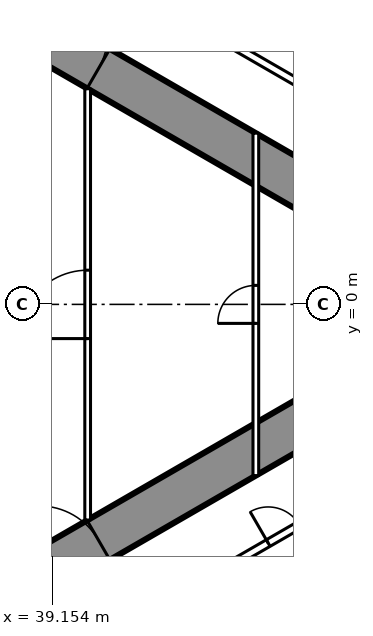
"""IFC4 building model, lengths in metres.
Left out: names, types, materials, properties, quantities, classifications, styles, units other than length and angle.
Written with IfcOpenShell. Run it as: python <this file> out.ifc"""

import sys

from ifc_helpers import new_model, si_unit, direction, frame, frame_2d, origin, place, context, subcontext, project, spatial, rectangle, extrude, element, fill, save


model = new_model("IFC4")
c1 = context("Model", 3, precision=1e-05, world=origin(), true_north=direction((0.0, 1.0)))
c2 = subcontext(c1, "Body", "Model", "MODEL_VIEW")
j1 = project(units=[si_unit("LENGTHUNIT", "METRE"), si_unit("PLANEANGLEUNIT", "RADIAN")], contexts=[c1])
p1 = place(None, origin())
s1 = spatial("IfcSite", under=j1, at=p1, CompositionType="ELEMENT")
p2 = place(p1, origin())
s2 = spatial("IfcBuilding", under=s1, at=p2, CompositionType="ELEMENT")
p3 = place(p2, frame((0.0, 0.0, 226.1)))
s3 = spatial("IfcBuildingStorey", under=s2, at=p3, CompositionType="ELEMENT", Elevation=226.1)
p4 = place(p3, frame((27.2, -13.8, 0.0), z_axis=(0.0, 0.0, 1.0), x_axis=(0.866027159892, 0.499996958321, 0.0)))
e1 = element("IfcWall", 1, at=p4, inside=s3, PredefinedType="SHEAR", context=c2, shape_type="SweptSolid", body=[
    extrude(rectangle(XDim=27.947, YDim=1.2, at=frame_2d((13.973, 0.0))), origin(), (0.0, 0.0, 1.0), 3.6),
])
p5 = place(p4, frame((4.6, 0.0, 0.0)))
e2 = element("IfcOpeningElement", 2, at=p5, cuts=e1, PredefinedType="OPENING", context=c2, shape_type="SweptSolid", body=[
    extrude(rectangle(XDim=1.0, YDim=2.2, at=frame_2d((0.5, 1.1))), frame((0.0, 0.61, 0.0), z_axis=(0.0, -1.0, 0.0), x_axis=(1.0, 0.0, 0.0)), (0.0, 0.0, 1.0), 1.22),
])
p6 = place(p4, frame((13.395, 0.0, 0.0)))
e3 = element("IfcOpeningElement", 3, at=p6, cuts=e1, PredefinedType="OPENING", context=c2, shape_type="SweptSolid", body=[
    extrude(rectangle(XDim=1.8, YDim=2.2, at=frame_2d((0.9, 1.1))), frame((0.0, 0.61, 0.0), z_axis=(0.0, -1.0, 0.0), x_axis=(1.0, 0.0, 0.0)), (0.0, 0.0, 1.0), 1.22),
])
p7 = place(p3, frame((27.2, 13.8, 0.0), z_axis=(0.0, 0.0, 1.0), x_axis=(0.866024515034, -0.500001539357, 0.0)))
e4 = element("IfcWall", 4, at=p7, inside=s3, PredefinedType="SHEAR", context=c2, shape_type="SweptSolid", body=[
    extrude(rectangle(XDim=26.907, YDim=1.2, at=frame_2d((13.454, 0.0))), origin(), (0.0, 0.0, 1.0), 3.6),
])
p8 = place(p7, frame((4.6, 0.0, 0.0)))
e5 = element("IfcOpeningElement", 5, at=p8, cuts=e4, PredefinedType="OPENING", context=c2, shape_type="SweptSolid", body=[
    extrude(rectangle(XDim=1.0, YDim=2.2, at=frame_2d((0.5, 1.1))), frame((0.0, 0.61, 0.0), z_axis=(0.0, -1.0, 0.0), x_axis=(1.0, 0.0, 0.0)), (0.0, 0.0, 1.0), 1.22),
])
p9 = place(p7, frame((13.395, 0.0, 0.0)))
e6 = element("IfcOpeningElement", 6, at=p9, cuts=e4, PredefinedType="OPENING", context=c2, shape_type="SweptSolid", body=[
    extrude(rectangle(XDim=1.8, YDim=2.2, at=frame_2d((0.9, 1.1))), frame((0.0, 0.61, 0.0), z_axis=(0.0, -1.0, 0.0), x_axis=(1.0, 0.0, 0.0)), (0.0, 0.0, 1.0), 1.22),
])
p10 = place(p3, frame((28.959, 15.44, 0.0), z_axis=(0.0, 0.0, 1.0), x_axis=(0.866028936079, -0.499993881836, 0.0)))
e7 = element("IfcWall", 7, at=p10, inside=s3, PredefinedType="PARTITIONING", context=c2, shape_type="SweptSolid", body=[
    extrude(rectangle(XDim=20.503, YDim=0.2, at=frame_2d((10.251, 0.0))), origin(), (0.0, 0.0, 1.0), 3.35),
])
p11 = place(p10, frame((16.137, 0.0, 0.0)))
e8 = element("IfcOpeningElement", 8, at=p11, cuts=e7, PredefinedType="OPENING", context=c2, shape_type="SweptSolid", body=[
    extrude(rectangle(XDim=0.95, YDim=2.2, at=frame_2d((0.475, 1.1))), frame((0.0, 0.11, 0.0), z_axis=(0.0, -1.0, 0.0), x_axis=(1.0, 0.0, 0.0)), (0.0, 0.0, 1.0), 0.22),
])
p12 = place(p10, frame((14.437, 0.0, 0.0)))
e9 = element("IfcOpeningElement", 9, at=p12, cuts=e7, PredefinedType="OPENING", context=c2, shape_type="SweptSolid", body=[
    extrude(rectangle(XDim=0.95, YDim=2.2, at=frame_2d((0.475, 1.1))), frame((0.0, 0.11, 0.0), z_axis=(0.0, -1.0, 0.0), x_axis=(1.0, 0.0, 0.0)), (0.0, 0.0, 1.0), 0.22),
])
p13 = place(p10, frame((2.244, 0.0, 0.0)))
e10 = element("IfcOpeningElement", 10, at=p13, cuts=e7, PredefinedType="OPENING", context=c2, shape_type="SweptSolid", body=[
    extrude(rectangle(XDim=1.8, YDim=2.04, at=frame_2d((0.9, 1.02))), frame((0.0, 0.11, 0.0), z_axis=(0.0, -1.0, 0.0), x_axis=(1.0, 0.0, 0.0)), (0.0, 0.0, 1.0), 0.22),
])
p14 = place(p3, frame((28.959, -15.44, 0.0), z_axis=(0.0, 0.0, 1.0), x_axis=(0.866025204199, 0.500000345692, 0.0)))
e11 = element("IfcWall", 11, at=p14, inside=s3, PredefinedType="PARTITIONING", context=c2, shape_type="SweptSolid", body=[
    extrude(rectangle(XDim=19.646, YDim=0.2, at=frame_2d((9.823, 0.0))), origin(), (0.0, 0.0, 1.0), 3.35),
])
p15 = place(p14, frame((1.494, 0.0, 0.0)))
e12 = element("IfcOpeningElement", 12, at=p15, cuts=e11, PredefinedType="OPENING", context=c2, shape_type="SweptSolid", body=[
    extrude(rectangle(XDim=1.8, YDim=2.04, at=frame_2d((0.9, 1.02))), frame((0.0, 0.11, 0.0), z_axis=(0.0, -1.0, 0.0), x_axis=(1.0, 0.0, 0.0)), (0.0, 0.0, 1.0), 0.22),
])
p16 = place(p14, frame((7.687, 0.0, 0.0)))
e13 = element("IfcOpeningElement", 13, at=p16, cuts=e11, PredefinedType="OPENING", context=c2, shape_type="SweptSolid", body=[
    extrude(rectangle(XDim=1.0, YDim=2.2, at=frame_2d((0.5, 1.1))), frame((0.0, 0.11, 0.0), z_axis=(0.0, -1.0, 0.0), x_axis=(1.0, 0.0, 0.0)), (0.0, 0.0, 1.0), 0.22),
])
p17 = place(p14, frame((18.321, 0.0, 0.0)))
e14 = element("IfcOpeningElement", 14, at=p17, cuts=e11, PredefinedType="OPENING", context=c2, shape_type="SweptSolid", body=[
    extrude(rectangle(XDim=0.95, YDim=2.2, at=frame_2d((0.475, 1.1))), frame((0.0, 0.11, 0.0), z_axis=(0.0, -1.0, 0.0), x_axis=(1.0, 0.0, 0.0)), (0.0, 0.0, 1.0), 0.22),
])
p18 = place(p3, frame((40.075, -5.674, 0.0), z_axis=(0.0, 0.0, 1.0), x_axis=(0.0, 1.0, 0.0)))
e15 = element("IfcWall", 15, at=p18, inside=s3, PredefinedType="PARTITIONING", context=c2, shape_type="SweptSolid", body=[
    extrude(rectangle(XDim=11.348, YDim=0.15, at=frame_2d((5.674, 0.0))), origin(), (0.0, 0.0, 1.0), 3.35),
])
p19 = place(p18, frame((4.774, 0.0, 0.0)))
e16 = element("IfcOpeningElement", 16, at=p19, cuts=e15, PredefinedType="OPENING", context=c2, shape_type="SweptSolid", body=[
    extrude(rectangle(XDim=1.8, YDim=2.2, at=frame_2d((0.9, 1.1))), frame((0.0, 0.085, 0.0), z_axis=(0.0, -1.0, 0.0), x_axis=(1.0, 0.0, 0.0)), (0.0, 0.0, 1.0), 0.17),
])
p20 = place(p3, frame((44.5, -4.505, 0.0), z_axis=(0.0, 0.0, 1.0), x_axis=(0.0, 1.0, 0.0)))
e17 = element("IfcWall", 17, at=p20, inside=s3, PredefinedType="PARTITIONING", context=c2, shape_type="SweptSolid", body=[
    extrude(rectangle(XDim=9.009, YDim=0.15, at=frame_2d((4.505, 0.0))), origin(), (0.0, 0.0, 1.0), 3.35),
])
p21 = place(p20, frame((4.005, 0.0, 0.0)))
e18 = element("IfcOpeningElement", 18, at=p21, cuts=e17, PredefinedType="OPENING", context=c2, shape_type="SweptSolid", body=[
    extrude(rectangle(XDim=1.0, YDim=2.2, at=frame_2d((0.5, 1.1))), frame((0.0, 0.085, 0.0), z_axis=(0.0, -1.0, 0.0), x_axis=(1.0, 0.0, 0.0)), (0.0, 0.0, 1.0), 0.17),
])
p22 = place(p17, origin())
e19 = element("IfcDoor", 19, at=p22, inside=s3, OperationType="SINGLE_SWING_LEFT", PredefinedType="DOOR", context=c2, shape_type="SweptSolid", body=[
    extrude(rectangle(XDim=0.95, YDim=2.2, at=frame_2d((0.475, 1.1))), frame((0.0, 0.025, 0.0), z_axis=(0.0, -1.0, 0.0), x_axis=(1.0, 0.0, 0.0)), (0.0, 0.0, 1.0), 0.05),
])
fill(e14, e19)
p23 = place(p19, origin())
e20 = element("IfcDoor", 20, at=p23, inside=s3, OperationType="DOUBLE_DOOR_SINGLE_SWING", PredefinedType="DOOR", context=c2, shape_type="SweptSolid", body=[
    extrude(rectangle(XDim=1.8, YDim=2.2, at=frame_2d((0.9, 1.1))), frame((0.0, 0.025, 0.0), z_axis=(0.0, -1.0, 0.0), x_axis=(1.0, 0.0, 0.0)), (0.0, 0.0, 1.0), 0.05),
])
fill(e16, e20)
p24 = place(p21, origin())
e21 = element("IfcDoor", 21, at=p24, inside=s3, OperationType="SINGLE_SWING_LEFT", PredefinedType="DOOR", context=c2, shape_type="SweptSolid", body=[
    extrude(rectangle(XDim=1.0, YDim=2.2, at=frame_2d((0.5, 1.1))), frame((0.0, 0.025, 0.0), z_axis=(0.0, -1.0, 0.0), x_axis=(1.0, 0.0, 0.0)), (0.0, 0.0, 1.0), 0.05),
])
fill(e18, e21)
p25 = place(p6, origin())
e22 = element("IfcDoor", 22, at=p25, inside=s3, OperationType="DOUBLE_DOOR_SINGLE_SWING", PredefinedType="DOOR", context=c2, shape_type="SweptSolid", body=[
    extrude(rectangle(XDim=1.8, YDim=2.2, at=frame_2d((0.9, 1.1))), frame((0.0, 0.025, 0.0), z_axis=(0.0, -1.0, 0.0), x_axis=(1.0, 0.0, 0.0)), (0.0, 0.0, 1.0), 0.05),
])
fill(e3, e22)
p26 = place(p9, origin())
e23 = element("IfcDoor", 23, at=p26, inside=s3, OperationType="DOUBLE_DOOR_SINGLE_SWING", PredefinedType="DOOR", context=c2, shape_type="SweptSolid", body=[
    extrude(rectangle(XDim=1.8, YDim=2.2, at=frame_2d((0.9, 1.1))), frame((0.0, 0.025, 0.0), z_axis=(0.0, -1.0, 0.0), x_axis=(1.0, 0.0, 0.0)), (0.0, 0.0, 1.0), 0.05),
])
fill(e6, e23)
save(model, sys.argv[1])
